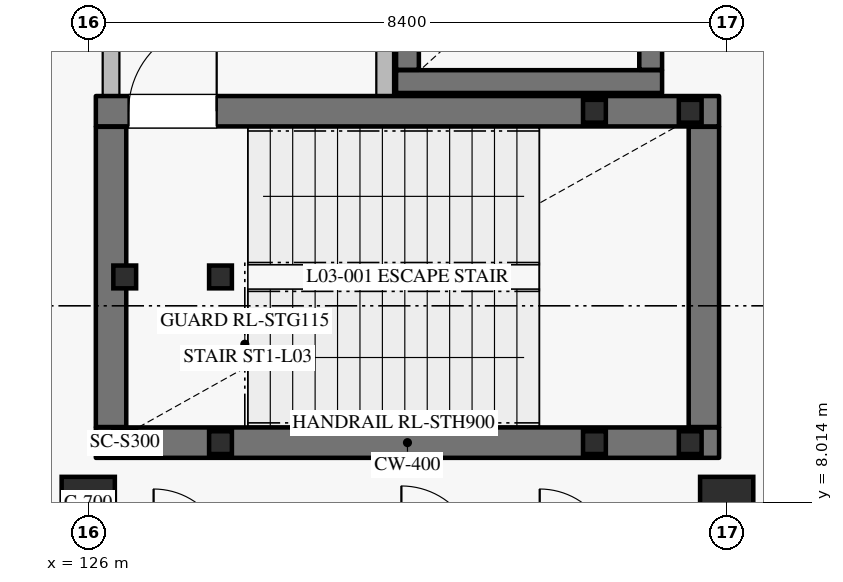
"""IFC4 building model, lengths in metres.
Left out: names, types, materials, properties, quantities, classifications, styles, units other than length and angle.
Written with IfcOpenShell. Run it as: python <this file> out.ifc"""

import sys

from ifc_helpers import new_model, si_unit, direction, frame, frame_2d, origin, origin_2d, place, context, subcontext, project, spatial, rectangle, hollow_rectangle, extrude, element, fill, save


model = new_model("IFC4")
c1 = context("Model", 3, precision=1e-05, world=origin(), true_north=direction((0.0, 1.0)))
c2 = subcontext(c1, "Body", "Model", "MODEL_VIEW")
j1 = project(units=[si_unit("LENGTHUNIT", "METRE"), si_unit("PLANEANGLEUNIT", "RADIAN")], contexts=[c1])
p1 = place(None, origin())
s1 = spatial("IfcSite", under=j1, at=p1, CompositionType="ELEMENT")
p2 = place(p1, origin())
s2 = spatial("IfcBuilding", under=s1, at=p2, CompositionType="ELEMENT")
p3 = place(p2, frame((0.0, 0.0, 16.2)))
s3 = spatial("IfcBuildingStorey", under=s2, at=p3, CompositionType="ELEMENT", Elevation=16.2)
for number, where, z_axis, x_axis in (
    (1, (126.0, 8.0, 0.0), (0.0, 0.0, 1.0), (1.0, 0.0, 0.0)),
    (2, (134.4, 8.0, 0.0), (0.0, 0.0, 1.0), (1.0, 0.0, 0.0)),
):
    element("IfcColumn", number, at=place(p3, frame(where, z_axis=z_axis, x_axis=x_axis)), inside=s3, PredefinedType="COLUMN", context=c2, shape_type="SweptSolid", body=[
        extrude(rectangle(XDim=0.7, YDim=0.7, at=origin_2d()), origin(), (0.0, 0.0, 1.0), 4.8),
    ])
p4 = place(p3, frame((130.05, 13.55, 0.0), z_axis=(0.0, 0.0, 1.0), x_axis=(1.0, 0.0, 0.0)))
e3 = element("IfcWall", 3, at=p4, inside=s3, PredefinedType="SHEAR", context=c2, shape_type="SweptSolid", body=[
    extrude(rectangle(XDim=3.5, YDim=0.3, at=frame_2d((1.75, 0.0))), origin(), (0.0, 0.0, 1.0), 4.535),
])
for number, where, z_axis, x_axis in (
    (4, (133.4, 13.705, 0.0), (0.0, 0.0, 1.0), (0.0, 1.0, 0.0)),
    (5, (130.2, 16.295, 0.0), (0.0, 0.0, 1.0), (0.0, -1.0, 0.0)),
):
    element("IfcWall", number, at=place(p3, frame(where, z_axis=z_axis, x_axis=x_axis)), inside=s3, PredefinedType="SHEAR", context=c2, shape_type="SweptSolid", body=[
        extrude(rectangle(XDim=2.59, YDim=0.3, at=frame_2d((1.295, 0.0))), origin(), (0.0, 0.0, 1.0), 4.535),
    ])
p5 = place(p3, frame((126.1, 8.8, 0.0), z_axis=(0.0, 0.0, 1.0), x_axis=(1.0, 0.0, 0.0)))
e6 = element("IfcWall", 6, at=p5, inside=s3, PredefinedType="SHEAR", context=c2, shape_type="SweptSolid", body=[
    extrude(rectangle(XDim=8.2, YDim=0.4, at=frame_2d((4.1, 0.0))), origin(), (0.0, 0.0, 1.0), 4.535),
])
p6 = place(p3, frame((134.1, 9.005, 0.0), z_axis=(0.0, 0.0, 1.0), x_axis=(0.0, 1.0, 0.0)))
e7 = element("IfcWall", 7, at=p6, inside=s3, PredefinedType="SHEAR", context=c2, shape_type="SweptSolid", body=[
    extrude(rectangle(XDim=3.95, YDim=0.4, at=frame_2d((1.975, 0.0))), origin(), (0.0, 0.0, 1.0), 4.535),
])
p7 = place(p3, frame((126.1, 13.16, 0.0), z_axis=(0.0, 0.0, 1.0), x_axis=(1.0, 0.0, 0.0)))
e8 = element("IfcWall", 8, at=p7, inside=s3, PredefinedType="SHEAR", context=c2, shape_type="SweptSolid", body=[
    extrude(rectangle(XDim=8.2, YDim=0.4, at=frame_2d((4.1, 0.0))), origin(), (0.0, 0.0, 1.0), 4.535),
])
p8 = place(p7, frame((0.43, 0.0, 0.0)))
e9 = element("IfcOpeningElement", 9, at=p8, cuts=e8, PredefinedType="OPENING", context=c2, shape_type="SweptSolid", body=[
    extrude(rectangle(XDim=1.16, YDim=2.2, at=frame_2d((0.58, 1.1))), frame((0.0, 0.21, 0.0), z_axis=(0.0, -1.0, 0.0), x_axis=(1.0, 0.0, 0.0)), (0.0, 0.0, 1.0), 0.42),
])
p9 = place(p3, frame((126.3, 9.005, 0.0), z_axis=(0.0, 0.0, 1.0), x_axis=(0.0, 1.0, 0.0)))
e10 = element("IfcWall", 10, at=p9, inside=s3, PredefinedType="SHEAR", context=c2, shape_type="SweptSolid", body=[
    extrude(rectangle(XDim=3.95, YDim=0.4, at=frame_2d((1.975, 0.0))), origin(), (0.0, 0.0, 1.0), 4.535),
])
p10 = place(p3, frame((126.3, 13.365, 0.0), z_axis=(0.0, 0.0, 1.0), x_axis=(0.0, 1.0, 0.0)))
e11 = element("IfcWall", 11, at=p10, inside=s3, PredefinedType="PARTITIONING", context=c2, shape_type="SweptSolid", body=[
    extrude(rectangle(XDim=5.82, YDim=0.22, at=frame_2d((2.91, 0.0))), origin(), (0.0, 0.0, 1.0), 4.535),
])
p11 = place(p3, frame((129.9, 13.365, 0.0), z_axis=(0.0, 0.0, 1.0), x_axis=(0.0, 1.0, 0.0)))
e12 = element("IfcWall", 12, at=p11, inside=s3, PredefinedType="PARTITIONING", context=c2, shape_type="SweptSolid", body=[
    extrude(rectangle(XDim=5.82, YDim=0.22, at=frame_2d((2.91, 0.0))), origin(), (0.0, 0.0, 1.0), 4.535),
])
p12 = place(p11, frame((3.335, 0.0, 0.0)))
e13 = element("IfcOpeningElement", 13, at=p12, cuts=e12, PredefinedType="OPENING", context=c2, shape_type="SweptSolid", body=[
    extrude(rectangle(XDim=1.24, YDim=2.2, at=frame_2d((0.62, 1.1))), frame((0.0, 0.12, 0.0), z_axis=(0.0, -1.0, 0.0), x_axis=(1.0, 0.0, 0.0)), (0.0, 0.0, 1.0), 0.24),
])
for number, where, z_axis, x_axis in (
    (14, (126.48, 8.8, 0.0), (0.0, 0.0, 1.0), (1.0, 0.0, 0.0)),
    (15, (126.48, 10.98, 0.0), (0.0, 0.0, 1.0), (1.0, 0.0, 0.0)),
    (16, (127.74, 8.8, 0.0), (0.0, 0.0, 1.0), (1.0, 0.0, 0.0)),
    (17, (127.74, 10.98, 0.0), (0.0, 0.0, 1.0), (1.0, 0.0, 0.0)),
):
    element("IfcColumn", number, at=place(p3, frame(where, z_axis=z_axis, x_axis=x_axis)), inside=s3, PredefinedType="COLUMN", context=c2, shape_type="SweptSolid", body=[
        extrude(hollow_rectangle(XDim=0.3, YDim=0.3, WallThickness=0.012, at=origin_2d()), origin(), (0.0, 0.0, 1.0), 4.62),
    ])
for number, where, z_axis, x_axis in (
    (18, (132.66, 8.8, -2.4), (0.0, 0.0, 1.0), (1.0, 0.0, 0.0)),
    (19, (132.66, 13.16, -2.4), (0.0, 0.0, 1.0), (1.0, 0.0, 0.0)),
    (20, (133.92, 8.8, -2.4), (0.0, 0.0, 1.0), (1.0, 0.0, 0.0)),
    (21, (133.92, 13.16, -2.4), (0.0, 0.0, 1.0), (1.0, 0.0, 0.0)),
):
    element("IfcColumn", number, at=place(p3, frame(where, z_axis=z_axis, x_axis=x_axis)), inside=s3, PredefinedType="COLUMN", context=c2, shape_type="SweptSolid", body=[
        extrude(hollow_rectangle(XDim=0.3, YDim=0.3, WallThickness=0.012, at=origin_2d()), origin(), (0.0, 0.0, 1.0), 4.62),
    ])
p13 = place(p8, origin())
e22 = element("IfcDoor", 22, at=p13, inside=s3, OperationType="SINGLE_SWING_RIGHT", PredefinedType="DOOR", context=c2, shape_type="SweptSolid", body=[
    extrude(rectangle(XDim=1.16, YDim=2.2, at=frame_2d((0.58, 1.1))), frame((0.0, 0.025, 0.0), z_axis=(0.0, -1.0, 0.0), x_axis=(1.0, 0.0, 0.0)), (0.0, 0.0, 1.0), 0.05),
])
fill(e9, e22)
save(model, sys.argv[1])
